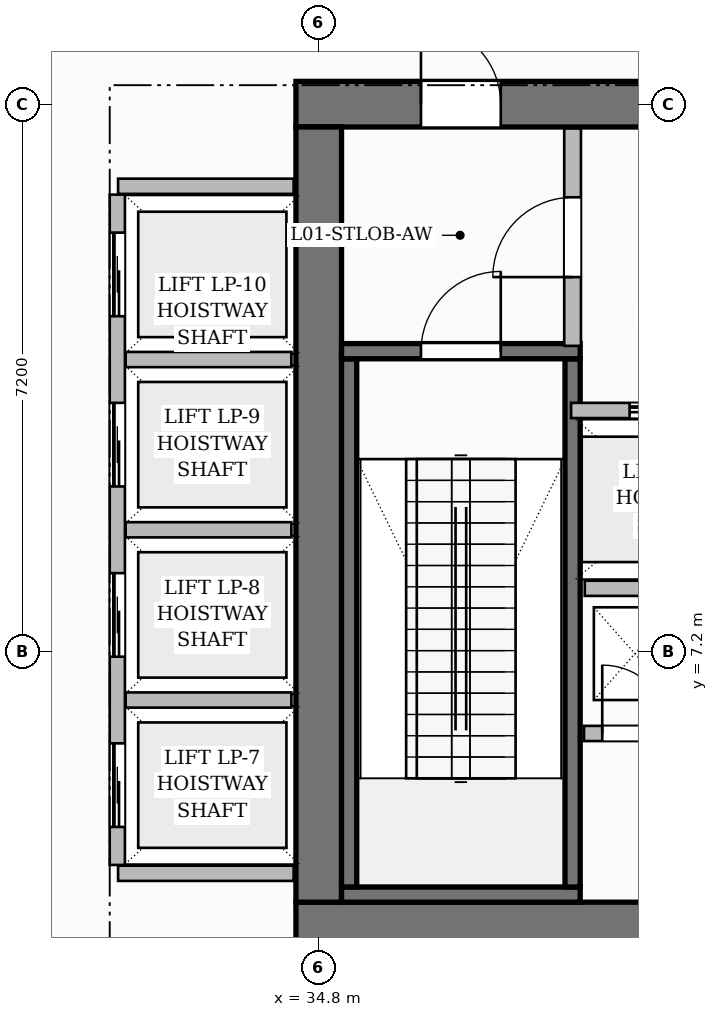
"""IFC4 building model, lengths in metres.
Left out: names, types, materials, properties, quantities, classifications, styles, units other than length and angle.
Written with IfcOpenShell. Run it as: python <this file> out.ifc"""

import sys

from ifc_helpers import new_model, si_unit, direction, frame, frame_2d, origin, place, context, subcontext, project, spatial, rectangle, extrude, source, transform, mapped, element, fill, save


model = new_model("IFC4")
c1 = context("Model", 3, precision=1e-05, world=origin(), true_north=direction((0.0, 1.0)))
c2 = subcontext(c1, "Body", "Model", "MODEL_VIEW")
j1 = project(units=[si_unit("LENGTHUNIT", "METRE"), si_unit("PLANEANGLEUNIT", "RADIAN")], contexts=[c1])
p1 = place(None, origin())
s1 = spatial("IfcSite", under=j1, at=p1, CompositionType="ELEMENT")
p2 = place(p1, origin())
s2 = spatial("IfcBuilding", under=s1, at=p2, CompositionType="ELEMENT")
p3 = place(p2, frame((0.0, 0.0, 5.4)))
s3 = spatial("IfcBuildingStorey", under=s2, at=p3, CompositionType="ELEMENT", Elevation=5.4)
p4 = place(p3, frame((34.5, 3.6, 0.0), z_axis=(0.0, 0.0, 1.0), x_axis=(1.0, 0.0, 0.0)))
e1 = element("IfcWall", 1, at=p4, inside=s3, PredefinedType="SHEAR", context=c2, shape_type="SweptSolid", body=[
    extrude(rectangle(XDim=15.6, YDim=0.6, at=frame_2d((7.8, 0.0))), origin(), (0.0, 0.0, 1.0), 5.4),
])
p5 = place(p4, frame((4.85, 0.0, 0.0)))
e2 = element("IfcOpeningElement", 2, at=p5, cuts=e1, PredefinedType="OPENING", context=c2, shape_type="SweptSolid", body=[
    extrude(rectangle(XDim=0.9, YDim=2.1, at=frame_2d((0.45, 1.05))), frame((0.0, 0.31, 0.0), z_axis=(0.0, -1.0, 0.0), x_axis=(1.0, 0.0, 0.0)), (0.0, 0.0, 1.0), 0.62),
])
p6 = place(p4, frame((7.27, 0.0, 0.0)))
e3 = element("IfcOpeningElement", 3, at=p6, cuts=e1, PredefinedType="OPENING", context=c2, shape_type="SweptSolid", body=[
    extrude(rectangle(XDim=0.9, YDim=2.1, at=frame_2d((0.45, 1.05))), frame((0.0, 0.31, 0.0), z_axis=(0.0, -1.0, 0.0), x_axis=(1.0, 0.0, 0.0)), (0.0, 0.0, 1.0), 0.62),
])
p7 = place(p3, frame((34.5, 14.4, 0.0), z_axis=(0.0, 0.0, 1.0), x_axis=(1.0, 0.0, 0.0)))
e4 = element("IfcWall", 4, at=p7, inside=s3, PredefinedType="SHEAR", context=c2, shape_type="SweptSolid", body=[
    extrude(rectangle(XDim=15.6, YDim=0.6, at=frame_2d((7.8, 0.0))), origin(), (0.0, 0.0, 1.0), 5.4),
])
p8 = place(p7, frame((5.43, 0.0, 0.0)))
e5 = element("IfcOpeningElement", 5, at=p8, cuts=e4, PredefinedType="OPENING", context=c2, shape_type="SweptSolid", body=[
    extrude(rectangle(XDim=1.5, YDim=2.2, at=frame_2d((0.75, 1.1))), frame((0.0, 0.31, 0.0), z_axis=(0.0, -1.0, 0.0), x_axis=(1.0, 0.0, 0.0)), (0.0, 0.0, 1.0), 0.62),
])
p9 = place(p7, frame((1.645, 0.0, 0.0)))
e6 = element("IfcOpeningElement", 6, at=p9, cuts=e4, PredefinedType="OPENING", context=c2, shape_type="SweptSolid", body=[
    extrude(rectangle(XDim=1.05, YDim=2.15, at=frame_2d((0.525, 1.075))), frame((0.0, 0.31, 0.0), z_axis=(0.0, -1.0, 0.0), x_axis=(1.0, 0.0, 0.0)), (0.0, 0.0, 1.0), 0.62),
])
p10 = place(p7, frame((11.275, 0.0, 0.0)))
e7 = element("IfcOpeningElement", 7, at=p10, cuts=e4, PredefinedType="OPENING", context=c2, shape_type="SweptSolid", body=[
    extrude(rectangle(XDim=1.05, YDim=2.15, at=frame_2d((0.525, 1.075))), frame((0.0, 0.31, 0.0), z_axis=(0.0, -1.0, 0.0), x_axis=(1.0, 0.0, 0.0)), (0.0, 0.0, 1.0), 0.62),
])
p11 = place(p3, frame((34.8, 3.9, 0.0), z_axis=(0.0, 0.0, 1.0), x_axis=(0.0, 1.0, 0.0)))
e8 = element("IfcWall", 8, at=p11, inside=s3, PredefinedType="SHEAR", context=c2, shape_type="SweptSolid", body=[
    extrude(rectangle(XDim=10.2, YDim=0.6, at=frame_2d((5.1, 0.0))), origin(), (0.0, 0.0, 1.0), 5.4),
])
p12 = place(p3, frame((35.1, 4.0, 0.0), z_axis=(0.0, 0.0, 1.0), x_axis=(1.0, 0.0, 0.0)))
e9 = element("IfcWall", 9, at=p12, inside=s3, PredefinedType="SHEAR", context=c2, shape_type="SweptSolid", body=[
    extrude(rectangle(XDim=3.14, YDim=0.2, at=frame_2d((1.57, 0.0))), origin(), (0.0, 0.0, 1.0), 5.4),
])
for number, where, z_axis, x_axis in (
    (10, (35.2, 4.1, 0.0), (0.0, 0.0, 1.0), (0.0, 1.0, 0.0)),
    (11, (38.14, 4.1, 0.0), (0.0, 0.0, 1.0), (0.0, 1.0, 0.0)),
):
    element("IfcWall", number, at=place(p3, frame(where, z_axis=z_axis, x_axis=x_axis)), inside=s3, PredefinedType="SHEAR", context=c2, shape_type="SweptSolid", body=[
        extrude(rectangle(XDim=6.95, YDim=0.2, at=frame_2d((3.475, 0.0))), origin(), (0.0, 0.0, 1.0), 5.4),
    ])
p13 = place(p3, frame((35.1, 11.15, 0.0), z_axis=(0.0, 0.0, 1.0), x_axis=(1.0, 0.0, 0.0)))
e12 = element("IfcWall", 12, at=p13, inside=s3, PredefinedType="SHEAR", context=c2, shape_type="SweptSolid", body=[
    extrude(rectangle(XDim=3.14, YDim=0.2, at=frame_2d((1.57, 0.0))), origin(), (0.0, 0.0, 1.0), 5.4),
])
p14 = place(p13, frame((1.045, 0.0, 0.0)))
e13 = element("IfcOpeningElement", 13, at=p14, cuts=e12, PredefinedType="OPENING", context=c2, shape_type="SweptSolid", body=[
    extrude(rectangle(XDim=1.05, YDim=2.2, at=frame_2d((0.525, 1.1))), frame((0.0, 0.11, 0.0), z_axis=(0.0, -1.0, 0.0), x_axis=(1.0, 0.0, 0.0)), (0.0, 0.0, 1.0), 0.22),
])
p15 = place(p3, frame((38.3, 8.03, 0.0), z_axis=(0.0, 0.0, 1.0), x_axis=(1.0, 0.0, 0.0)))
e14 = element("IfcWall", 14, at=p15, inside=s3, PredefinedType="PARTITIONING", context=c2, shape_type="SweptSolid", body=[
    extrude(rectangle(XDim=4.74, YDim=0.2, at=frame_2d((2.37, 0.0))), origin(), (0.0, 0.0, 1.0), 5.1),
])
p16 = place(p3, frame((38.14, 11.22, 0.0), z_axis=(0.0, 0.0, 1.0), x_axis=(0.0, 1.0, 0.0)))
e15 = element("IfcWall", 15, at=p16, inside=s3, PredefinedType="PARTITIONING", context=c2, shape_type="SweptSolid", body=[
    extrude(rectangle(XDim=2.86, YDim=0.22, at=frame_2d((1.43, 0.0))), origin(), (0.0, 0.0, 1.0), 5.1),
])
p17 = place(p16, frame((0.905, 0.0, 0.0)))
e16 = element("IfcOpeningElement", 16, at=p17, cuts=e15, PredefinedType="OPENING", context=c2, shape_type="SweptSolid", body=[
    extrude(rectangle(XDim=1.05, YDim=2.15, at=frame_2d((0.525, 1.075))), frame((0.0, 0.12, 0.0), z_axis=(0.0, -1.0, 0.0), x_axis=(1.0, 0.0, 0.0)), (0.0, 0.0, 1.0), 0.24),
])
p18 = place(p3, frame((38.29, 6.12, 0.0), z_axis=(0.0, 0.0, 1.0), x_axis=(1.0, 0.0, 0.0)))
e17 = element("IfcWall", 17, at=p18, inside=s3, PredefinedType="PARTITIONING", context=c2, shape_type="SweptSolid", body=[
    extrude(rectangle(XDim=1.38, YDim=0.2, at=frame_2d((0.69, 0.0))), origin(), (0.0, 0.0, 1.0), 5.1),
])
p19 = place(p18, frame((0.24, 0.0, 0.0)))
e18 = element("IfcOpeningElement", 18, at=p19, cuts=e17, PredefinedType="OPENING", context=c2, shape_type="SweptSolid", body=[
    extrude(rectangle(XDim=0.9, YDim=2.1, at=frame_2d((0.45, 1.05))), frame((0.0, 0.11, 0.0), z_axis=(0.0, -1.0, 0.0), x_axis=(1.0, 0.0, 0.0)), (0.0, 0.0, 1.0), 0.22),
])
for number, where, z_axis, x_axis in (
    (19, (32.16, 4.28, 0.0), (0.0, 0.0, 1.0), (1.0, 0.0, 0.0)),
    (20, (32.16, 13.32, 0.0), (0.0, 0.0, 1.0), (1.0, 0.0, 0.0)),
):
    element("IfcWall", number, at=place(p3, frame(where, z_axis=z_axis, x_axis=x_axis)), inside=s3, PredefinedType="PARTITIONING", context=c2, shape_type="SweptSolid", body=[
        extrude(rectangle(XDim=2.31, YDim=0.2, at=frame_2d((1.155, 0.0))), origin(), (0.0, 0.0, 1.0), 5.1),
    ])
p20 = place(p3, frame((32.15, 4.39, 0.0), z_axis=(0.0, 0.0, 1.0), x_axis=(0.0, 1.0, 0.0)))
e21 = element("IfcWall", 21, at=p20, inside=s3, PredefinedType="PARTITIONING", context=c2, shape_type="SweptSolid", body=[
    extrude(rectangle(XDim=8.82, YDim=0.2, at=frame_2d((4.41, 0.0))), origin(), (0.0, 0.0, 1.0), 5.1),
])
p21 = place(p20, frame((0.5, 0.0, 0.0)))
e22 = element("IfcOpeningElement", 22, at=p21, cuts=e21, PredefinedType="OPENING", context=c2, shape_type="SweptSolid", body=[
    extrude(rectangle(XDim=1.1, YDim=2.2, at=frame_2d((0.55, 1.1))), frame((0.0, 0.11, 0.0), z_axis=(0.0, -1.0, 0.0), x_axis=(1.0, 0.0, 0.0)), (0.0, 0.0, 1.0), 0.22),
])
p22 = place(p20, frame((2.74, 0.0, 0.0)))
e23 = element("IfcOpeningElement", 23, at=p22, cuts=e21, PredefinedType="OPENING", context=c2, shape_type="SweptSolid", body=[
    extrude(rectangle(XDim=1.1, YDim=2.2, at=frame_2d((0.55, 1.1))), frame((0.0, 0.11, 0.0), z_axis=(0.0, -1.0, 0.0), x_axis=(1.0, 0.0, 0.0)), (0.0, 0.0, 1.0), 0.22),
])
p23 = place(p20, frame((4.98, 0.0, 0.0)))
e24 = element("IfcOpeningElement", 24, at=p23, cuts=e21, PredefinedType="OPENING", context=c2, shape_type="SweptSolid", body=[
    extrude(rectangle(XDim=1.1, YDim=2.2, at=frame_2d((0.55, 1.1))), frame((0.0, 0.11, 0.0), z_axis=(0.0, -1.0, 0.0), x_axis=(1.0, 0.0, 0.0)), (0.0, 0.0, 1.0), 0.22),
])
p24 = place(p20, frame((7.22, 0.0, 0.0)))
e25 = element("IfcOpeningElement", 25, at=p24, cuts=e21, PredefinedType="OPENING", context=c2, shape_type="SweptSolid", body=[
    extrude(rectangle(XDim=1.1, YDim=2.2, at=frame_2d((0.55, 1.1))), frame((0.0, 0.11, 0.0), z_axis=(0.0, -1.0, 0.0), x_axis=(1.0, 0.0, 0.0)), (0.0, 0.0, 1.0), 0.22),
])
for number, where, z_axis, x_axis in (
    (26, (32.26, 6.56, 0.0), (0.0, 0.0, 1.0), (1.0, 0.0, 0.0)),
    (27, (32.26, 8.8, 0.0), (0.0, 0.0, 1.0), (1.0, 0.0, 0.0)),
    (28, (32.26, 11.04, 0.0), (0.0, 0.0, 1.0), (1.0, 0.0, 0.0)),
):
    element("IfcWall", number, at=place(p3, frame(where, z_axis=z_axis, x_axis=x_axis)), inside=s3, PredefinedType="PARTITIONING", context=c2, shape_type="SweptSolid", body=[
        extrude(rectangle(XDim=2.18, YDim=0.2, at=frame_2d((1.09, 0.0))), origin(), (0.0, 0.0, 1.0), 5.1),
    ])
p25 = place(p3, frame((38.12, 10.37, 0.0), z_axis=(0.0, 0.0, 1.0), x_axis=(1.0, 0.0, 0.0)))
e29 = element("IfcWall", 29, at=p25, inside=s3, PredefinedType="PARTITIONING", context=c2, shape_type="SweptSolid", body=[
    extrude(rectangle(XDim=2.64, YDim=0.2, at=frame_2d((1.32, 0.0))), origin(), (0.0, 0.0, 1.0), 5.1),
])
p26 = place(p25, frame((0.77, 0.0, 0.0)))
e30 = element("IfcOpeningElement", 30, at=p26, cuts=e29, PredefinedType="OPENING", context=c2, shape_type="SweptSolid", body=[
    extrude(rectangle(XDim=1.1, YDim=2.2, at=frame_2d((0.55, 1.1))), frame((0.0, 0.11, 0.0), z_axis=(0.0, -1.0, 0.0), x_axis=(1.0, 0.0, 0.0)), (0.0, 0.0, 1.0), 0.22),
])
m1 = source(origin(), c2, "Body", "SweptSolid", [
    extrude(rectangle(XDim=1.05, YDim=2.2, at=frame_2d((0.525, 1.1))), frame((0.0, 0.025, 0.0), z_axis=(0.0, -1.0, 0.0), x_axis=(1.0, 0.0, 0.0)), (0.0, 0.0, 1.0), 0.05),
])
p27 = place(p14, origin())
e31 = element("IfcDoor", 31, at=p27, inside=s3, OperationType="SINGLE_SWING_RIGHT", PredefinedType="DOOR", context=c2, shape_type="MappedRepresentation", body=[
    mapped(m1, transform((0.0, 0.0, 0.0), scale=1.0)),
])
fill(e13, e31)
m2 = source(origin(), c2, "Body", "SweptSolid", [
    extrude(rectangle(XDim=1.05, YDim=2.15, at=frame_2d((0.525, 1.075))), frame((0.0, 0.025, 0.0), z_axis=(0.0, -1.0, 0.0), x_axis=(1.0, 0.0, 0.0)), (0.0, 0.0, 1.0), 0.05),
])
p28 = place(p17, origin())
e32 = element("IfcDoor", 32, at=p28, inside=s3, OperationType="SINGLE_SWING_LEFT", PredefinedType="DOOR", context=c2, shape_type="MappedRepresentation", body=[
    mapped(m2, transform((0.0, 0.0, 0.0), scale=1.0)),
])
fill(e16, e32)
p29 = place(p9, origin())
e33 = element("IfcDoor", 33, at=p29, inside=s3, OperationType="SINGLE_SWING_LEFT", PredefinedType="DOOR", context=c2, shape_type="MappedRepresentation", body=[
    mapped(m2, transform((0.0, 0.0, 0.0), scale=1.0)),
])
fill(e6, e33)
m3 = source(origin(), c2, "Body", "SweptSolid", [
    extrude(rectangle(XDim=0.9, YDim=2.1, at=frame_2d((0.45, 1.05))), frame((0.0, 0.025, 0.0), z_axis=(0.0, -1.0, 0.0), x_axis=(1.0, 0.0, 0.0)), (0.0, 0.0, 1.0), 0.05),
])
p30 = place(p19, origin())
e34 = element("IfcDoor", 34, at=p30, inside=s3, OperationType="SINGLE_SWING_LEFT", PredefinedType="DOOR", context=c2, shape_type="MappedRepresentation", body=[
    mapped(m3, transform((0.0, 0.0, 0.0), scale=1.0)),
])
fill(e18, e34)
m4 = source(origin(), c2, "Body", "SweptSolid", [
    extrude(rectangle(XDim=1.1, YDim=2.2, at=frame_2d((0.55, 1.1))), frame((0.0, 0.025, 0.0), z_axis=(0.0, -1.0, 0.0), x_axis=(1.0, 0.0, 0.0)), (0.0, 0.0, 1.0), 0.05),
])
p31 = place(p26, origin())
e35 = element("IfcDoor", 35, at=p31, inside=s3, OperationType="SLIDING_TO_LEFT", PredefinedType="DOOR", context=c2, shape_type="MappedRepresentation", body=[
    mapped(m4, transform((0.0, 0.0, 0.0), scale=1.0)),
])
fill(e30, e35)
p32 = place(p21, origin())
e36 = element("IfcDoor", 36, at=p32, inside=s3, OperationType="SLIDING_TO_LEFT", PredefinedType="DOOR", context=c2, shape_type="MappedRepresentation", body=[
    mapped(m4, transform((0.0, 0.0, 0.0), scale=1.0)),
])
fill(e22, e36)
p33 = place(p22, origin())
e37 = element("IfcDoor", 37, at=p33, inside=s3, OperationType="SLIDING_TO_LEFT", PredefinedType="DOOR", context=c2, shape_type="MappedRepresentation", body=[
    mapped(m4, transform((0.0, 0.0, 0.0), scale=1.0)),
])
fill(e23, e37)
p34 = place(p23, origin())
e38 = element("IfcDoor", 38, at=p34, inside=s3, OperationType="SLIDING_TO_LEFT", PredefinedType="DOOR", context=c2, shape_type="MappedRepresentation", body=[
    mapped(m4, transform((0.0, 0.0, 0.0), scale=1.0)),
])
fill(e24, e38)
p35 = place(p24, origin())
e39 = element("IfcDoor", 39, at=p35, inside=s3, OperationType="SLIDING_TO_LEFT", PredefinedType="DOOR", context=c2, shape_type="MappedRepresentation", body=[
    mapped(m4, transform((0.0, 0.0, 0.0), scale=1.0)),
])
fill(e25, e39)
save(model, sys.argv[1])
